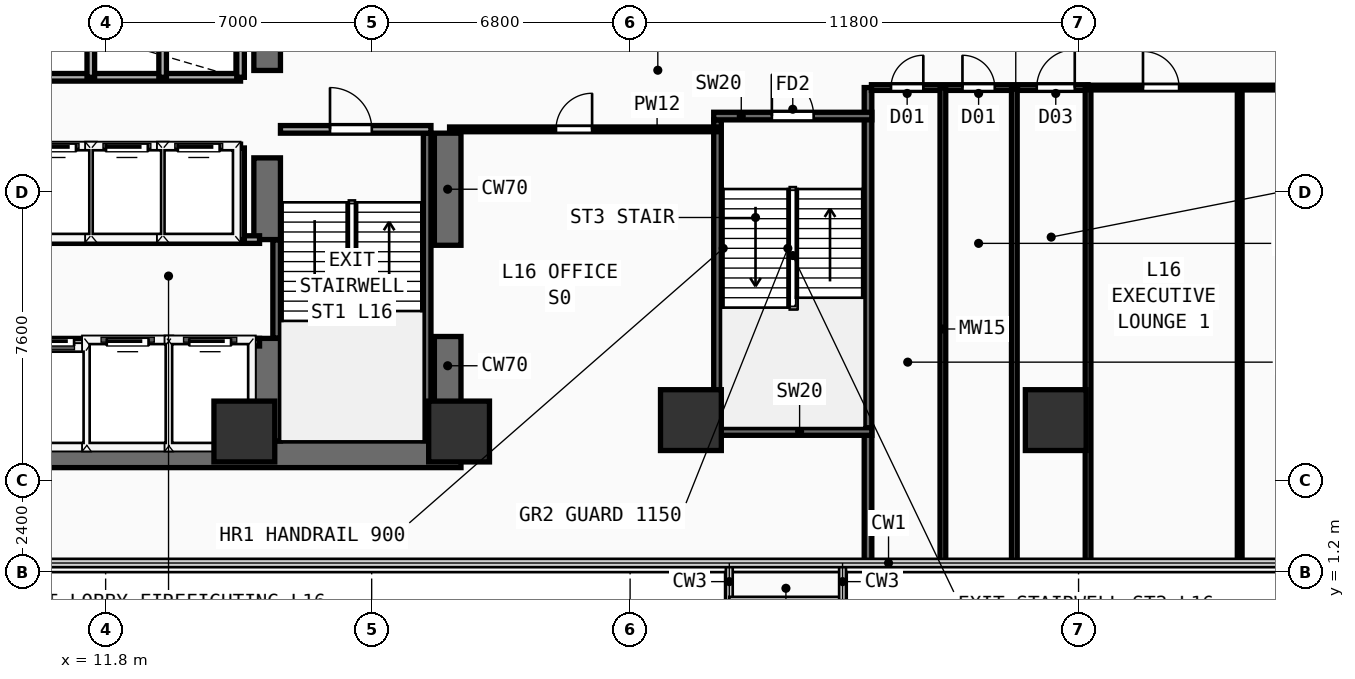
"""IFC4 building model, lengths in metres.
Left out: names, types, materials, properties, quantities, classifications, styles, units other than length and angle.
Written with IfcOpenShell. Run it as: python <this file> out.ifc"""

import sys

from ifc_helpers import new_model, si_unit, direction, frame, frame_2d, origin, origin_2d, place, context, subcontext, project, spatial, rectangle, extrude, element, fill, save


model = new_model("IFC4")
c1 = context("Model", 3, precision=1e-05, world=origin(), true_north=direction((0.0, 1.0)))
c2 = subcontext(c1, "Body", "Model", "MODEL_VIEW")
j1 = project(units=[si_unit("LENGTHUNIT", "METRE"), si_unit("PLANEANGLEUNIT", "RADIAN")], contexts=[c1])
p1 = place(None, origin())
s1 = spatial("IfcSite", under=j1, at=p1, CompositionType="ELEMENT")
p2 = place(p1, origin())
s2 = spatial("IfcBuilding", under=s1, at=p2, CompositionType="ELEMENT")
p3 = place(p2, frame((0.0, 0.0, 63.8)))
s3 = spatial("IfcBuildingStorey", under=s2, at=p3, CompositionType="ELEMENT", Elevation=63.8)
p4 = place(p3, frame((7.1, 4.3, 0.0), z_axis=(0.0, 0.0, 1.0), x_axis=(1.0, 0.0, 0.0)))
e1 = element("IfcWall", 1, at=p4, inside=s3, PredefinedType="SHEAR", context=c2, shape_type="SweptSolid", body=[
    extrude(rectangle(XDim=14.05, YDim=0.7, at=frame_2d((7.025, 0.0))), origin(), (0.0, 0.0, 1.0), 3.54),
])
p5 = place(p3, frame((20.8, 4.65, 0.0), z_axis=(0.0, 0.0, 1.0), x_axis=(0.0, 1.0, 0.0)))
e2 = element("IfcWall", 2, at=p5, inside=s3, PredefinedType="SHEAR", context=c2, shape_type="SweptSolid", body=[
    extrude(rectangle(XDim=2.75, YDim=0.7, at=frame_2d((1.375, 0.0))), origin(), (0.0, 0.0, 1.0), 3.54),
])
p6 = place(p3, frame((20.8, 9.8, 0.0), z_axis=(0.0, 0.0, 1.0), x_axis=(0.0, 1.0, 0.0)))
e3 = element("IfcWall", 3, at=p6, inside=s3, PredefinedType="SHEAR", context=c2, shape_type="SweptSolid", body=[
    extrude(rectangle(XDim=2.95, YDim=0.7, at=frame_2d((1.475, 0.0))), origin(), (0.0, 0.0, 1.0), 3.54),
])
p7 = place(p3, frame((16.05, 4.65, 0.0), z_axis=(0.0, 0.0, 1.0), x_axis=(0.0, 1.0, 0.0)))
e4 = element("IfcWall", 4, at=p7, inside=s3, PredefinedType="SHEAR", context=c2, shape_type="SweptSolid", body=[
    extrude(rectangle(XDim=2.7, YDim=0.7, at=frame_2d((1.35, 0.0))), origin(), (0.0, 0.0, 1.0), 3.54),
])
p8 = place(p3, frame((16.05, 9.95, 0.0), z_axis=(0.0, 0.0, 1.0), x_axis=(0.0, 1.0, 0.0)))
e5 = element("IfcWall", 5, at=p8, inside=s3, PredefinedType="SHEAR", context=c2, shape_type="SweptSolid", body=[
    extrude(rectangle(XDim=2.15, YDim=0.7, at=frame_2d((1.075, 0.0))), origin(), (0.0, 0.0, 1.0), 3.54),
])
p9 = place(p3, frame((16.05, 14.4, 0.0), z_axis=(0.0, 0.0, 1.0), x_axis=(0.0, 1.0, 0.0)))
e6 = element("IfcWall", 6, at=p9, inside=s3, PredefinedType="SHEAR", context=c2, shape_type="SweptSolid", body=[
    extrude(rectangle(XDim=9.1, YDim=0.7, at=frame_2d((4.55, 0.0))), origin(), (0.0, 0.0, 1.0), 3.54),
])
for number, where, z_axis, x_axis in (
    (7, (15.45, 4.9, 0.0), (0.0, 0.0, 1.0), (1.0, 0.0, 0.0)),
    (8, (21.1, 4.9, 0.0), (0.0, 0.0, 1.0), (1.0, 0.0, 0.0)),
    (9, (27.2, 5.2, 0.0), (0.0, 0.0, 1.0), (1.0, 0.0, 0.0)),
    (10, (36.8, 5.2, 0.0), (0.0, 0.0, 1.0), (1.0, 0.0, 0.0)),
):
    element("IfcColumn", number, at=place(p3, frame(where, z_axis=z_axis, x_axis=x_axis)), inside=s3, PredefinedType="COLUMN", context=c2, shape_type="SweptSolid", body=[
        extrude(rectangle(XDim=1.6, YDim=1.6, at=origin_2d()), origin(), (0.0, 0.0, 1.0), 3.54),
    ])
p10 = place(p3, frame((16.3, 7.36, 0.0), z_axis=(0.0, 0.0, 1.0), x_axis=(0.0, 1.0, 0.0)))
e11 = element("IfcWall", 11, at=p10, inside=s3, PredefinedType="SHEAR", context=c2, shape_type="SweptSolid", body=[
    extrude(rectangle(XDim=2.58, YDim=0.2, at=frame_2d((1.29, 0.0))), origin(), (0.0, 0.0, 1.0), 3.54),
])
p11 = place(p3, frame((20.26, 4.66, 0.0), z_axis=(0.0, 0.0, 1.0), x_axis=(0.0, 1.0, 0.0)))
e12 = element("IfcWall", 12, at=p11, inside=s3, PredefinedType="SHEAR", context=c2, shape_type="SweptSolid", body=[
    extrude(rectangle(XDim=8.09, YDim=0.2, at=frame_2d((4.045, 0.0))), origin(), (0.0, 0.0, 1.0), 3.54),
])
p12 = place(p3, frame((16.4, 12.85, 0.0), z_axis=(0.0, 0.0, 1.0), x_axis=(1.0, 0.0, 0.0)))
e13 = element("IfcWall", 13, at=p12, inside=s3, PredefinedType="PARTITIONING", context=c2, shape_type="SweptSolid", body=[
    extrude(rectangle(XDim=3.96, YDim=0.2, at=frame_2d((1.98, 0.0))), origin(), (0.0, 0.0, 1.0), 3.54),
])
p13 = place(p12, frame((1.304, 0.0, 0.0)))
e14 = element("IfcOpeningElement", 14, at=p13, cuts=e13, PredefinedType="OPENING", context=c2, shape_type="SweptSolid", body=[
    extrude(rectangle(XDim=1.1, YDim=2.2, at=frame_2d((0.55, 1.1))), frame((0.0, 0.11, 0.0), z_axis=(0.0, -1.0, 0.0), x_axis=(1.0, 0.0, 0.0)), (0.0, 0.0, 1.0), 0.22),
])
p14 = place(p3, frame((27.9, 5.0, 0.0), z_axis=(0.0, 0.0, 1.0), x_axis=(0.0, 1.0, 0.0)))
e15 = element("IfcWall", 15, at=p14, inside=s3, PredefinedType="SHEAR", context=c2, shape_type="SweptSolid", body=[
    extrude(rectangle(XDim=8.1, YDim=0.2, at=frame_2d((4.05, 0.0))), origin(), (0.0, 0.0, 1.0), 3.54),
])
p15 = place(p3, frame((31.86, 1.44, 0.0), z_axis=(0.0, 0.0, 1.0), x_axis=(0.0, 1.0, 0.0)))
e16 = element("IfcWall", 16, at=p15, inside=s3, PredefinedType="SHEAR", context=c2, shape_type="SweptSolid", body=[
    extrude(rectangle(XDim=12.51, YDim=0.2, at=frame_2d((6.255, 0.0))), origin(), (0.0, 0.0, 1.0), 3.54),
])
p16 = place(p3, frame((27.8, 4.9, 0.0), z_axis=(0.0, 0.0, 1.0), x_axis=(1.0, 0.0, 0.0)))
e17 = element("IfcWall", 17, at=p16, inside=s3, PredefinedType="SHEAR", context=c2, shape_type="SweptSolid", body=[
    extrude(rectangle(XDim=4.16, YDim=0.2, at=frame_2d((2.08, 0.0))), origin(), (0.0, 0.0, 1.0), 3.54),
])
p17 = place(p3, frame((27.8, 13.2, 0.0), z_axis=(0.0, 0.0, 1.0), x_axis=(1.0, 0.0, 0.0)))
e18 = element("IfcWall", 18, at=p17, inside=s3, PredefinedType="SHEAR", context=c2, shape_type="SweptSolid", body=[
    extrude(rectangle(XDim=4.16, YDim=0.2, at=frame_2d((2.08, 0.0))), origin(), (0.0, 0.0, 1.0), 3.54),
])
p18 = place(p17, frame((1.53, 0.0, 0.0)))
e19 = element("IfcOpeningElement", 19, at=p18, cuts=e18, PredefinedType="OPENING", context=c2, shape_type="SweptSolid", body=[
    extrude(rectangle(XDim=1.1, YDim=2.2, at=frame_2d((0.55, 1.1))), frame((0.0, 0.11, 0.0), z_axis=(0.0, -1.0, 0.0), x_axis=(1.0, 0.0, 0.0)), (0.0, 0.0, 1.0), 0.22),
])
p19 = place(p3, frame((7.5, 7.25, 0.0), z_axis=(0.0, 0.0, 1.0), x_axis=(1.0, 0.0, 0.0)))
e20 = element("IfcWall", 20, at=p19, inside=s3, PredefinedType="PARTITIONING", context=c2, shape_type="SweptSolid", body=[
    extrude(rectangle(XDim=8.35, YDim=0.2, at=frame_2d((4.175, 0.0))), origin(), (0.0, 0.0, 1.0), 3.54),
])
p20 = place(p19, frame((0.53, 0.0, 0.0)))
e21 = element("IfcOpeningElement", 21, at=p20, cuts=e20, PredefinedType="OPENING", context=c2, shape_type="SweptSolid", body=[
    extrude(rectangle(XDim=1.1, YDim=2.2, at=frame_2d((0.55, 1.1))), frame((0.0, 0.11, 0.0), z_axis=(0.0, -1.0, 0.0), x_axis=(1.0, 0.0, 0.0)), (0.0, 0.0, 1.0), 0.22),
])
p21 = place(p19, frame((2.37, 0.0, 0.0)))
e22 = element("IfcOpeningElement", 22, at=p21, cuts=e20, PredefinedType="OPENING", context=c2, shape_type="SweptSolid", body=[
    extrude(rectangle(XDim=1.1, YDim=2.2, at=frame_2d((0.55, 1.1))), frame((0.0, 0.11, 0.0), z_axis=(0.0, -1.0, 0.0), x_axis=(1.0, 0.0, 0.0)), (0.0, 0.0, 1.0), 0.22),
])
p22 = place(p19, frame((4.33, 0.0, 0.0)))
e23 = element("IfcOpeningElement", 23, at=p22, cuts=e20, PredefinedType="OPENING", context=c2, shape_type="SweptSolid", body=[
    extrude(rectangle(XDim=1.1, YDim=2.2, at=frame_2d((0.55, 1.1))), frame((0.0, 0.11, 0.0), z_axis=(0.0, -1.0, 0.0), x_axis=(1.0, 0.0, 0.0)), (0.0, 0.0, 1.0), 0.22),
])
p23 = place(p19, frame((6.5, 0.0, 0.0)))
e24 = element("IfcOpeningElement", 24, at=p23, cuts=e20, PredefinedType="OPENING", context=c2, shape_type="SweptSolid", body=[
    extrude(rectangle(XDim=1.1, YDim=2.2, at=frame_2d((0.55, 1.1))), frame((0.0, 0.11, 0.0), z_axis=(0.0, -1.0, 0.0), x_axis=(1.0, 0.0, 0.0)), (0.0, 0.0, 1.0), 0.22),
])
p24 = place(p3, frame((7.5, 9.95, 0.0), z_axis=(0.0, 0.0, 1.0), x_axis=(1.0, 0.0, 0.0)))
e25 = element("IfcWall", 25, at=p24, inside=s3, PredefinedType="PARTITIONING", context=c2, shape_type="SweptSolid", body=[
    extrude(rectangle(XDim=8.35, YDim=0.2, at=frame_2d((4.175, 0.0))), origin(), (0.0, 0.0, 1.0), 3.54),
])
for number, where, z_axis, x_axis in (
    (26, (11.36, 4.45, 0.0), (0.0, 0.0, 1.0), (0.0, 1.0, 0.0)),
    (27, (13.46, 4.45, 0.0), (0.0, 0.0, 1.0), (0.0, 1.0, 0.0)),
):
    element("IfcWall", number, at=place(p3, frame(where, z_axis=z_axis, x_axis=x_axis)), inside=s3, PredefinedType="PARTITIONING", context=c2, shape_type="SweptSolid", body=[
        extrude(rectangle(XDim=2.8, YDim=0.2, at=frame_2d((1.4, 0.0))), origin(), (0.0, 0.0, 1.0), 3.54),
    ])
p25 = place(p3, frame((7.5, 12.36, 0.0), z_axis=(0.0, 0.0, 1.0), x_axis=(1.0, 0.0, 0.0)))
e28 = element("IfcWall", 28, at=p25, inside=s3, PredefinedType="PARTITIONING", context=c2, shape_type="SweptSolid", body=[
    extrude(rectangle(XDim=7.85, YDim=0.2, at=frame_2d((3.925, 0.0))), origin(), (0.0, 0.0, 1.0), 3.54),
])
p26 = place(p25, frame((0.53, 0.0, 0.0)))
e29 = element("IfcOpeningElement", 29, at=p26, cuts=e28, PredefinedType="OPENING", context=c2, shape_type="SweptSolid", body=[
    extrude(rectangle(XDim=1.1, YDim=2.2, at=frame_2d((0.55, 1.1))), frame((0.0, 0.11, 0.0), z_axis=(0.0, -1.0, 0.0), x_axis=(1.0, 0.0, 0.0)), (0.0, 0.0, 1.0), 0.22),
])
p27 = place(p25, frame((2.42, 0.0, 0.0)))
e30 = element("IfcOpeningElement", 30, at=p27, cuts=e28, PredefinedType="OPENING", context=c2, shape_type="SweptSolid", body=[
    extrude(rectangle(XDim=1.1, YDim=2.2, at=frame_2d((0.55, 1.1))), frame((0.0, 0.11, 0.0), z_axis=(0.0, -1.0, 0.0), x_axis=(1.0, 0.0, 0.0)), (0.0, 0.0, 1.0), 0.22),
])
p28 = place(p25, frame((4.31, 0.0, 0.0)))
e31 = element("IfcOpeningElement", 31, at=p28, cuts=e28, PredefinedType="OPENING", context=c2, shape_type="SweptSolid", body=[
    extrude(rectangle(XDim=1.1, YDim=2.2, at=frame_2d((0.55, 1.1))), frame((0.0, 0.11, 0.0), z_axis=(0.0, -1.0, 0.0), x_axis=(1.0, 0.0, 0.0)), (0.0, 0.0, 1.0), 0.22),
])
p29 = place(p25, frame((6.2, 0.0, 0.0)))
e32 = element("IfcOpeningElement", 32, at=p29, cuts=e28, PredefinedType="OPENING", context=c2, shape_type="SweptSolid", body=[
    extrude(rectangle(XDim=1.1, YDim=2.2, at=frame_2d((0.55, 1.1))), frame((0.0, 0.11, 0.0), z_axis=(0.0, -1.0, 0.0), x_axis=(1.0, 0.0, 0.0)), (0.0, 0.0, 1.0), 0.22),
])
for number, where, z_axis, x_axis in (
    (33, (15.35, 9.95, 0.0), (0.0, 0.0, 1.0), (0.0, 1.0, 0.0)),
    (34, (11.41, 9.95, 0.0), (0.0, 0.0, 1.0), (0.0, 1.0, 0.0)),
    (35, (13.3, 9.95, 0.0), (0.0, 0.0, 1.0), (0.0, 1.0, 0.0)),
):
    element("IfcWall", number, at=place(p3, frame(where, z_axis=z_axis, x_axis=x_axis)), inside=s3, PredefinedType="PARTITIONING", context=c2, shape_type="SweptSolid", body=[
        extrude(rectangle(XDim=2.41, YDim=0.2, at=frame_2d((1.205, 0.0))), origin(), (0.0, 0.0, 1.0), 3.54),
    ])
p30 = place(p3, frame((7.5, 14.22, 0.0), z_axis=(0.0, 0.0, 1.0), x_axis=(1.0, 0.0, 0.0)))
e36 = element("IfcWall", 36, at=p30, inside=s3, PredefinedType="PARTITIONING", context=c2, shape_type="SweptSolid", body=[
    extrude(rectangle(XDim=7.85, YDim=0.2, at=frame_2d((3.925, 0.0))), origin(), (0.0, 0.0, 1.0), 3.54),
])
for number, where, z_axis, x_axis in (
    (37, (15.35, 14.22, 0.0), (0.0, 0.0, 1.0), (0.0, 1.0, 0.0)),
    (38, (11.41, 14.22, 0.0), (0.0, 0.0, 1.0), (0.0, 1.0, 0.0)),
    (39, (13.3, 14.22, 0.0), (0.0, 0.0, 1.0), (0.0, 1.0, 0.0)),
):
    element("IfcWall", number, at=place(p3, frame(where, z_axis=z_axis, x_axis=x_axis)), inside=s3, PredefinedType="PARTITIONING", context=c2, shape_type="SweptSolid", body=[
        extrude(rectangle(XDim=2.23, YDim=0.2, at=frame_2d((1.115, 0.0))), origin(), (0.0, 0.0, 1.0), 3.54),
    ])
p31 = place(p3, frame((31.95, 13.95, 0.0), z_axis=(0.0, 0.0, 1.0), x_axis=(1.0, 0.0, 0.0)))
e40 = element("IfcWall", 40, at=p31, inside=s3, PredefinedType="PLUMBINGWALL", context=c2, shape_type="SweptSolid", body=[
    extrude(rectangle(XDim=5.7, YDim=0.15, at=frame_2d((2.85, 0.0))), origin(), (0.0, 0.0, 1.0), 3.54),
])
p32 = place(p31, frame((0.515, 0.0, 0.0)))
e41 = element("IfcOpeningElement", 41, at=p32, cuts=e40, PredefinedType="OPENING", context=c2, shape_type="SweptSolid", body=[
    extrude(rectangle(XDim=0.85, YDim=2.15, at=frame_2d((0.425, 1.075))), frame((0.0, 0.085, 0.0), z_axis=(0.0, -1.0, 0.0), x_axis=(1.0, 0.0, 0.0)), (0.0, 0.0, 1.0), 0.17),
])
p33 = place(p31, frame((2.395, 0.0, 0.0)))
e42 = element("IfcOpeningElement", 42, at=p33, cuts=e40, PredefinedType="OPENING", context=c2, shape_type="SweptSolid", body=[
    extrude(rectangle(XDim=0.85, YDim=2.15, at=frame_2d((0.425, 1.075))), frame((0.0, 0.085, 0.0), z_axis=(0.0, -1.0, 0.0), x_axis=(1.0, 0.0, 0.0)), (0.0, 0.0, 1.0), 0.17),
])
p34 = place(p31, frame((4.35, 0.0, 0.0)))
e43 = element("IfcOpeningElement", 43, at=p34, cuts=e40, PredefinedType="OPENING", context=c2, shape_type="SweptSolid", body=[
    extrude(rectangle(XDim=1.0, YDim=2.2, at=frame_2d((0.5, 1.1))), frame((0.0, 0.085, 0.0), z_axis=(0.0, -1.0, 0.0), x_axis=(1.0, 0.0, 0.0)), (0.0, 0.0, 1.0), 0.17),
])
for number, where, z_axis, x_axis in (
    (44, (33.83, 1.44, 0.0), (0.0, 0.0, 1.0), (0.0, 1.0, 0.0)),
    (45, (35.71, 1.44, 0.0), (0.0, 0.0, 1.0), (0.0, 1.0, 0.0)),
    (46, (37.65, 1.44, 0.0), (0.0, 0.0, 1.0), (0.0, 1.0, 0.0)),
):
    element("IfcWall", number, at=place(p3, frame(where, z_axis=z_axis, x_axis=x_axis)), inside=s3, PredefinedType="PLUMBINGWALL", context=c2, shape_type="SweptSolid", body=[
        extrude(rectangle(XDim=12.51, YDim=0.15, at=frame_2d((6.255, 0.0))), origin(), (0.0, 0.0, 1.0), 3.54),
    ])
p35 = place(p3, frame((20.85, 12.85, 0.0), z_axis=(0.0, 0.0, 1.0), x_axis=(1.0, 0.0, 0.0)))
e47 = element("IfcWall", 47, at=p35, inside=s3, PredefinedType="PARTITIONING", context=c2, shape_type="SweptSolid", body=[
    extrude(rectangle(XDim=7.05, YDim=0.125, at=frame_2d((3.525, 0.0))), origin(), (0.0, 0.0, 1.0), 3.54),
])
p36 = place(p35, frame((2.8, 0.0, 0.0)))
e48 = element("IfcOpeningElement", 48, at=p36, cuts=e47, PredefinedType="OPENING", context=c2, shape_type="SweptSolid", body=[
    extrude(rectangle(XDim=0.95, YDim=2.15, at=frame_2d((0.475, 1.075))), frame((0.0, 0.073, 0.0), z_axis=(0.0, -1.0, 0.0), x_axis=(1.0, 0.0, 0.0)), (0.0, 0.0, 1.0), 0.145),
])
p37 = place(p3, frame((37.65, 13.95, 0.0), z_axis=(0.0, 0.0, 1.0), x_axis=(1.0, 0.0, 0.0)))
e49 = element("IfcWall", 49, at=p37, inside=s3, PredefinedType="PARTITIONING", context=c2, shape_type="SweptSolid", body=[
    extrude(rectangle(XDim=15.95, YDim=0.125, at=frame_2d((7.975, 0.0))), origin(), (0.0, 0.0, 1.0), 3.54),
])
p38 = place(p37, frame((1.445, 0.0, 0.0)))
e50 = element("IfcOpeningElement", 50, at=p38, cuts=e49, PredefinedType="OPENING", context=c2, shape_type="SweptSolid", body=[
    extrude(rectangle(XDim=0.95, YDim=2.15, at=frame_2d((0.475, 1.075))), frame((0.0, 0.073, 0.0), z_axis=(0.0, -1.0, 0.0), x_axis=(1.0, 0.0, 0.0)), (0.0, 0.0, 1.0), 0.145),
])
p39 = place(p37, frame((6.936, 0.0, 0.0)))
e51 = element("IfcOpeningElement", 51, at=p39, cuts=e49, PredefinedType="OPENING", context=c2, shape_type="SweptSolid", body=[
    extrude(rectangle(XDim=0.95, YDim=2.15, at=frame_2d((0.475, 1.075))), frame((0.0, 0.073, 0.0), z_axis=(0.0, -1.0, 0.0), x_axis=(1.0, 0.0, 0.0)), (0.0, 0.0, 1.0), 0.145),
])
p40 = place(p37, frame((12.37, 0.0, 0.0)))
e52 = element("IfcOpeningElement", 52, at=p40, cuts=e49, PredefinedType="OPENING", context=c2, shape_type="SweptSolid", body=[
    extrude(rectangle(XDim=0.95, YDim=2.15, at=frame_2d((0.475, 1.075))), frame((0.0, 0.073, 0.0), z_axis=(0.0, -1.0, 0.0), x_axis=(1.0, 0.0, 0.0)), (0.0, 0.0, 1.0), 0.145),
])
p41 = place(p3, frame((41.64, 1.44, 0.0), z_axis=(0.0, 0.0, 1.0), x_axis=(0.0, 1.0, 0.0)))
e53 = element("IfcWall", 53, at=p41, inside=s3, PredefinedType="PARTITIONING", context=c2, shape_type="SweptSolid", body=[
    extrude(rectangle(XDim=12.51, YDim=0.125, at=frame_2d((6.255, 0.0))), origin(), (0.0, 0.0, 1.0), 3.54),
])
p42 = place(p13, frame((1.1, 0.0, 0.0), z_axis=(0.0, 0.0, 1.0), x_axis=(-1.0, 0.0, 0.0)))
e54 = element("IfcDoor", 54, at=p42, inside=s3, OperationType="SINGLE_SWING_RIGHT", PredefinedType="DOOR", context=c2, shape_type="SweptSolid", body=[
    extrude(rectangle(XDim=1.1, YDim=2.2, at=frame_2d((0.55, 1.1))), frame((0.0, 0.025, 0.0), z_axis=(0.0, -1.0, 0.0), x_axis=(1.0, 0.0, 0.0)), (0.0, 0.0, 1.0), 0.05),
])
fill(e14, e54)
p43 = place(p18, frame((1.1, 0.0, 0.0), z_axis=(0.0, 0.0, 1.0), x_axis=(-1.0, 0.0, 0.0)))
e55 = element("IfcDoor", 55, at=p43, inside=s3, OperationType="SINGLE_SWING_RIGHT", PredefinedType="DOOR", context=c2, shape_type="SweptSolid", body=[
    extrude(rectangle(XDim=1.1, YDim=2.2, at=frame_2d((0.55, 1.1))), frame((0.0, 0.025, 0.0), z_axis=(0.0, -1.0, 0.0), x_axis=(1.0, 0.0, 0.0)), (0.0, 0.0, 1.0), 0.05),
])
fill(e19, e55)
p44 = place(p21, origin())
e56 = element("IfcDoor", 56, at=p44, inside=s3, OperationType="SLIDING_TO_LEFT", PredefinedType="DOOR", context=c2, shape_type="SweptSolid", body=[
    extrude(rectangle(XDim=1.1, YDim=2.2, at=frame_2d((0.55, 1.1))), frame((0.0, 0.025, 0.0), z_axis=(0.0, -1.0, 0.0), x_axis=(1.0, 0.0, 0.0)), (0.0, 0.0, 1.0), 0.05),
])
fill(e22, e56)
p45 = place(p22, origin())
e57 = element("IfcDoor", 57, at=p45, inside=s3, OperationType="SLIDING_TO_LEFT", PredefinedType="DOOR", context=c2, shape_type="SweptSolid", body=[
    extrude(rectangle(XDim=1.1, YDim=2.2, at=frame_2d((0.55, 1.1))), frame((0.0, 0.025, 0.0), z_axis=(0.0, -1.0, 0.0), x_axis=(1.0, 0.0, 0.0)), (0.0, 0.0, 1.0), 0.05),
])
fill(e23, e57)
p46 = place(p23, origin())
e58 = element("IfcDoor", 58, at=p46, inside=s3, OperationType="SLIDING_TO_LEFT", PredefinedType="DOOR", context=c2, shape_type="SweptSolid", body=[
    extrude(rectangle(XDim=1.1, YDim=2.2, at=frame_2d((0.55, 1.1))), frame((0.0, 0.025, 0.0), z_axis=(0.0, -1.0, 0.0), x_axis=(1.0, 0.0, 0.0)), (0.0, 0.0, 1.0), 0.05),
])
fill(e24, e58)
p47 = place(p27, origin())
e59 = element("IfcDoor", 59, at=p47, inside=s3, OperationType="SLIDING_TO_LEFT", PredefinedType="DOOR", context=c2, shape_type="SweptSolid", body=[
    extrude(rectangle(XDim=1.1, YDim=2.2, at=frame_2d((0.55, 1.1))), frame((0.0, 0.025, 0.0), z_axis=(0.0, -1.0, 0.0), x_axis=(1.0, 0.0, 0.0)), (0.0, 0.0, 1.0), 0.05),
])
fill(e30, e59)
p48 = place(p28, origin())
e60 = element("IfcDoor", 60, at=p48, inside=s3, OperationType="SLIDING_TO_LEFT", PredefinedType="DOOR", context=c2, shape_type="SweptSolid", body=[
    extrude(rectangle(XDim=1.1, YDim=2.2, at=frame_2d((0.55, 1.1))), frame((0.0, 0.025, 0.0), z_axis=(0.0, -1.0, 0.0), x_axis=(1.0, 0.0, 0.0)), (0.0, 0.0, 1.0), 0.05),
])
fill(e31, e60)
p49 = place(p29, origin())
e61 = element("IfcDoor", 61, at=p49, inside=s3, OperationType="SLIDING_TO_LEFT", PredefinedType="DOOR", context=c2, shape_type="SweptSolid", body=[
    extrude(rectangle(XDim=1.1, YDim=2.2, at=frame_2d((0.55, 1.1))), frame((0.0, 0.025, 0.0), z_axis=(0.0, -1.0, 0.0), x_axis=(1.0, 0.0, 0.0)), (0.0, 0.0, 1.0), 0.05),
])
fill(e32, e61)
p50 = place(p32, origin())
e62 = element("IfcDoor", 62, at=p50, inside=s3, OperationType="SINGLE_SWING_RIGHT", PredefinedType="DOOR", context=c2, shape_type="SweptSolid", body=[
    extrude(rectangle(XDim=0.85, YDim=2.15, at=frame_2d((0.425, 1.075))), frame((0.0, 0.025, 0.0), z_axis=(0.0, -1.0, 0.0), x_axis=(1.0, 0.0, 0.0)), (0.0, 0.0, 1.0), 0.05),
])
fill(e41, e62)
p51 = place(p33, origin())
e63 = element("IfcDoor", 63, at=p51, inside=s3, OperationType="SINGLE_SWING_LEFT", PredefinedType="DOOR", context=c2, shape_type="SweptSolid", body=[
    extrude(rectangle(XDim=0.85, YDim=2.15, at=frame_2d((0.425, 1.075))), frame((0.0, 0.025, 0.0), z_axis=(0.0, -1.0, 0.0), x_axis=(1.0, 0.0, 0.0)), (0.0, 0.0, 1.0), 0.05),
])
fill(e42, e63)
p52 = place(p34, origin())
e64 = element("IfcDoor", 64, at=p52, inside=s3, OperationType="SINGLE_SWING_RIGHT", PredefinedType="DOOR", context=c2, shape_type="SweptSolid", body=[
    extrude(rectangle(XDim=1.0, YDim=2.2, at=frame_2d((0.5, 1.1))), frame((0.0, 0.025, 0.0), z_axis=(0.0, -1.0, 0.0), x_axis=(1.0, 0.0, 0.0)), (0.0, 0.0, 1.0), 0.05),
])
fill(e43, e64)
p53 = place(p36, origin())
e65 = element("IfcDoor", 65, at=p53, inside=s3, OperationType="SINGLE_SWING_RIGHT", PredefinedType="DOOR", context=c2, shape_type="SweptSolid", body=[
    extrude(rectangle(XDim=0.95, YDim=2.15, at=frame_2d((0.475, 1.075))), frame((0.0, 0.025, 0.0), z_axis=(0.0, -1.0, 0.0), x_axis=(1.0, 0.0, 0.0)), (0.0, 0.0, 1.0), 0.05),
])
fill(e48, e65)
p54 = place(p38, origin())
e66 = element("IfcDoor", 66, at=p54, inside=s3, OperationType="SINGLE_SWING_LEFT", PredefinedType="DOOR", context=c2, shape_type="SweptSolid", body=[
    extrude(rectangle(XDim=0.95, YDim=2.15, at=frame_2d((0.475, 1.075))), frame((0.0, 0.025, 0.0), z_axis=(0.0, -1.0, 0.0), x_axis=(1.0, 0.0, 0.0)), (0.0, 0.0, 1.0), 0.05),
])
fill(e50, e66)
save(model, sys.argv[1])
